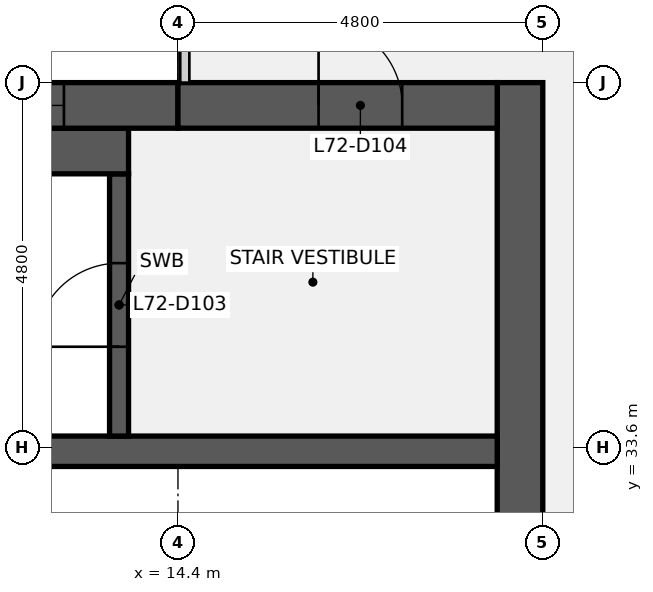
"""IFC4 building model, lengths in metres.
Left out: names, types, materials, properties, quantities, classifications, styles, units other than length and angle.
Written with IfcOpenShell. Run it as: python <this file> out.ifc"""

import sys

from ifc_helpers import new_model, si_unit, direction, frame, frame_2d, origin, place, context, subcontext, project, spatial, rectangle, extrude, element, fill, save


model = new_model("IFC4")
c1 = context("Model", 3, precision=1e-05, world=origin(), true_north=direction((0.0, 1.0)))
c2 = subcontext(c1, "Body", "Model", "MODEL_VIEW")
j1 = project(units=[si_unit("LENGTHUNIT", "METRE"), si_unit("PLANEANGLEUNIT", "RADIAN")], contexts=[c1])
p1 = place(None, origin())
s1 = spatial("IfcSite", under=j1, at=p1, CompositionType="ELEMENT")
p2 = place(p1, origin())
s2 = spatial("IfcBuilding", under=s1, at=p2, CompositionType="ELEMENT")
p3 = place(p2, frame((0.0, 0.0, 326.3)))
s3 = spatial("IfcBuildingStorey", under=s2, at=p3, CompositionType="ELEMENT", Elevation=326.3)
p4 = place(p3, frame((18.9, 38.4, 0.0), z_axis=(0.0, 0.0, 1.0), x_axis=(0.0, -1.0, 0.0)))
e1 = element("IfcWall", 1, at=p4, inside=s3, PredefinedType="SHEAR", context=c2, shape_type="SweptSolid", body=[
    extrude(rectangle(XDim=28.8, YDim=0.6, at=frame_2d((14.4, 0.0))), origin(), (0.0, 0.0, 1.0), 3.84),
])
p5 = place(p4, frame((18.3, 0.0, 0.0)))
e2 = element("IfcOpeningElement", 2, at=p5, cuts=e1, PredefinedType="OPENING", context=c2, shape_type="SweptSolid", body=[
    extrude(rectangle(XDim=1.8, YDim=2.1, at=frame_2d((0.9, 1.05))), frame((0.0, 0.31, 0.0), z_axis=(0.0, -1.0, 0.0), x_axis=(1.0, 0.0, 0.0)), (0.0, 0.0, 1.0), 0.62),
])
p6 = place(p4, frame((8.7, 0.0, 0.0)))
e3 = element("IfcOpeningElement", 3, at=p6, cuts=e1, PredefinedType="OPENING", context=c2, shape_type="SweptSolid", body=[
    extrude(rectangle(XDim=1.8, YDim=2.1, at=frame_2d((0.9, 1.05))), frame((0.0, 0.31, 0.0), z_axis=(0.0, -1.0, 0.0), x_axis=(1.0, 0.0, 0.0)), (0.0, 0.0, 1.0), 0.62),
])
p7 = place(p3, frame((0.6, 33.55, 0.0), z_axis=(0.0, 0.0, 1.0), x_axis=(1.0, 0.0, 0.0)))
e4 = element("IfcWall", 4, at=p7, inside=s3, PredefinedType="SHEAR", context=c2, shape_type="SweptSolid", body=[
    extrude(rectangle(XDim=18.0, YDim=0.4, at=frame_2d((9.0, 0.0))), origin(), (0.0, 0.0, 1.0), 3.84),
])
p8 = place(p3, frame((13.625, 33.75, 0.0), z_axis=(0.0, 0.0, 1.0), x_axis=(0.0, 1.0, 0.0)))
e5 = element("IfcWall", 5, at=p8, inside=s3, PredefinedType="SHEAR", context=c2, shape_type="SweptSolid", body=[
    extrude(rectangle(XDim=3.45, YDim=0.25, at=frame_2d((1.725, 0.0))), origin(), (0.0, 0.0, 1.0), 3.84),
])
p9 = place(p8, frame((1.175, 0.0, 0.0)))
e6 = element("IfcOpeningElement", 6, at=p9, cuts=e5, PredefinedType="OPENING", context=c2, shape_type="SweptSolid", body=[
    extrude(rectangle(XDim=1.1, YDim=2.1, at=frame_2d((0.55, 1.05))), frame((0.0, 0.135, 0.0), z_axis=(0.0, -1.0, 0.0), x_axis=(1.0, 0.0, 0.0)), (0.0, 0.0, 1.0), 0.27),
])
p10 = place(p3, frame((6.25, 37.5, 0.0), z_axis=(0.0, 0.0, 1.0), x_axis=(1.0, 0.0, 0.0)))
e7 = element("IfcWall", 7, at=p10, inside=s3, PredefinedType="SHEAR", context=c2, shape_type="SweptSolid", body=[
    extrude(rectangle(XDim=7.5, YDim=0.6, at=frame_2d((3.75, 0.0))), origin(), (0.0, 0.0, 1.0), 3.84),
])
p11 = place(p3, frame((0.6, 38.1, 0.0), z_axis=(0.0, 0.0, 1.0), x_axis=(1.0, 0.0, 0.0)))
e8 = element("IfcWall", 8, at=p11, inside=s3, PredefinedType="SHEAR", context=c2, shape_type="SweptSolid", body=[
    extrude(rectangle(XDim=13.8, YDim=0.6, at=frame_2d((6.9, 0.0))), origin(), (0.0, 0.0, 1.0), 3.84),
])
p12 = place(p11, frame((5.7, 0.0, 0.9)))
e9 = element("IfcOpeningElement", 9, at=p12, cuts=e8, PredefinedType="OPENING", context=c2, shape_type="SweptSolid", body=[
    extrude(rectangle(XDim=1.8, YDim=1.5, at=frame_2d((0.9, 0.75))), frame((0.0, 0.31, 0.0), z_axis=(0.0, -1.0, 0.0), x_axis=(1.0, 0.0, 0.0)), (0.0, 0.0, 1.0), 0.62),
])
p13 = place(p11, frame((10.5, 0.0, 0.9)))
e10 = element("IfcOpeningElement", 10, at=p13, cuts=e8, PredefinedType="OPENING", context=c2, shape_type="SweptSolid", body=[
    extrude(rectangle(XDim=1.8, YDim=1.5, at=frame_2d((0.9, 0.75))), frame((0.0, 0.31, 0.0), z_axis=(0.0, -1.0, 0.0), x_axis=(1.0, 0.0, 0.0)), (0.0, 0.0, 1.0), 0.62),
])
p14 = place(p3, frame((14.4, 38.1, 0.0), z_axis=(0.0, 0.0, 1.0), x_axis=(1.0, 0.0, 0.0)))
e11 = element("IfcWall", 11, at=p14, inside=s3, PredefinedType="SHEAR", context=c2, shape_type="SweptSolid", body=[
    extrude(rectangle(XDim=4.2, YDim=0.6, at=frame_2d((2.1, 0.0))), origin(), (0.0, 0.0, 1.0), 3.84),
])
p15 = place(p14, frame((1.85, 0.0, 0.0)))
e12 = element("IfcOpeningElement", 12, at=p15, cuts=e11, PredefinedType="OPENING", context=c2, shape_type="SweptSolid", body=[
    extrude(rectangle(XDim=1.1, YDim=2.1, at=frame_2d((0.55, 1.05))), frame((0.0, 0.31, 0.0), z_axis=(0.0, -1.0, 0.0), x_axis=(1.0, 0.0, 0.0)), (0.0, 0.0, 1.0), 0.62),
])
p16 = place(p9, origin())
e13 = element("IfcDoor", 13, at=p16, inside=s3, OperationType="SINGLE_SWING_LEFT", PredefinedType="DOOR", context=c2, shape_type="SweptSolid", body=[
    extrude(rectangle(XDim=1.1, YDim=2.1, at=frame_2d((0.55, 1.05))), frame((0.0, 0.025, 0.0), z_axis=(0.0, -1.0, 0.0), x_axis=(1.0, 0.0, 0.0)), (0.0, 0.0, 1.0), 0.05),
])
fill(e6, e13)
p17 = place(p15, origin())
e14 = element("IfcDoor", 14, at=p17, inside=s3, OperationType="SINGLE_SWING_LEFT", PredefinedType="DOOR", context=c2, shape_type="SweptSolid", body=[
    extrude(rectangle(XDim=1.1, YDim=2.1, at=frame_2d((0.55, 1.05))), frame((0.0, 0.025, 0.0), z_axis=(0.0, -1.0, 0.0), x_axis=(1.0, 0.0, 0.0)), (0.0, 0.0, 1.0), 0.05),
])
fill(e12, e14)
p18 = place(p13, origin())
e15 = element("IfcWindow", 15, at=p18, inside=s3, PartitioningType="SINGLE_PANEL", PredefinedType="WINDOW", context=c2, shape_type="SweptSolid", body=[
    extrude(rectangle(XDim=1.8, YDim=1.5, at=frame_2d((0.9, 0.75))), frame((0.0, 0.03, 0.0), z_axis=(0.0, -1.0, 0.0), x_axis=(1.0, 0.0, 0.0)), (0.0, 0.0, 1.0), 0.06),
])
fill(e10, e15)
save(model, sys.argv[1])
